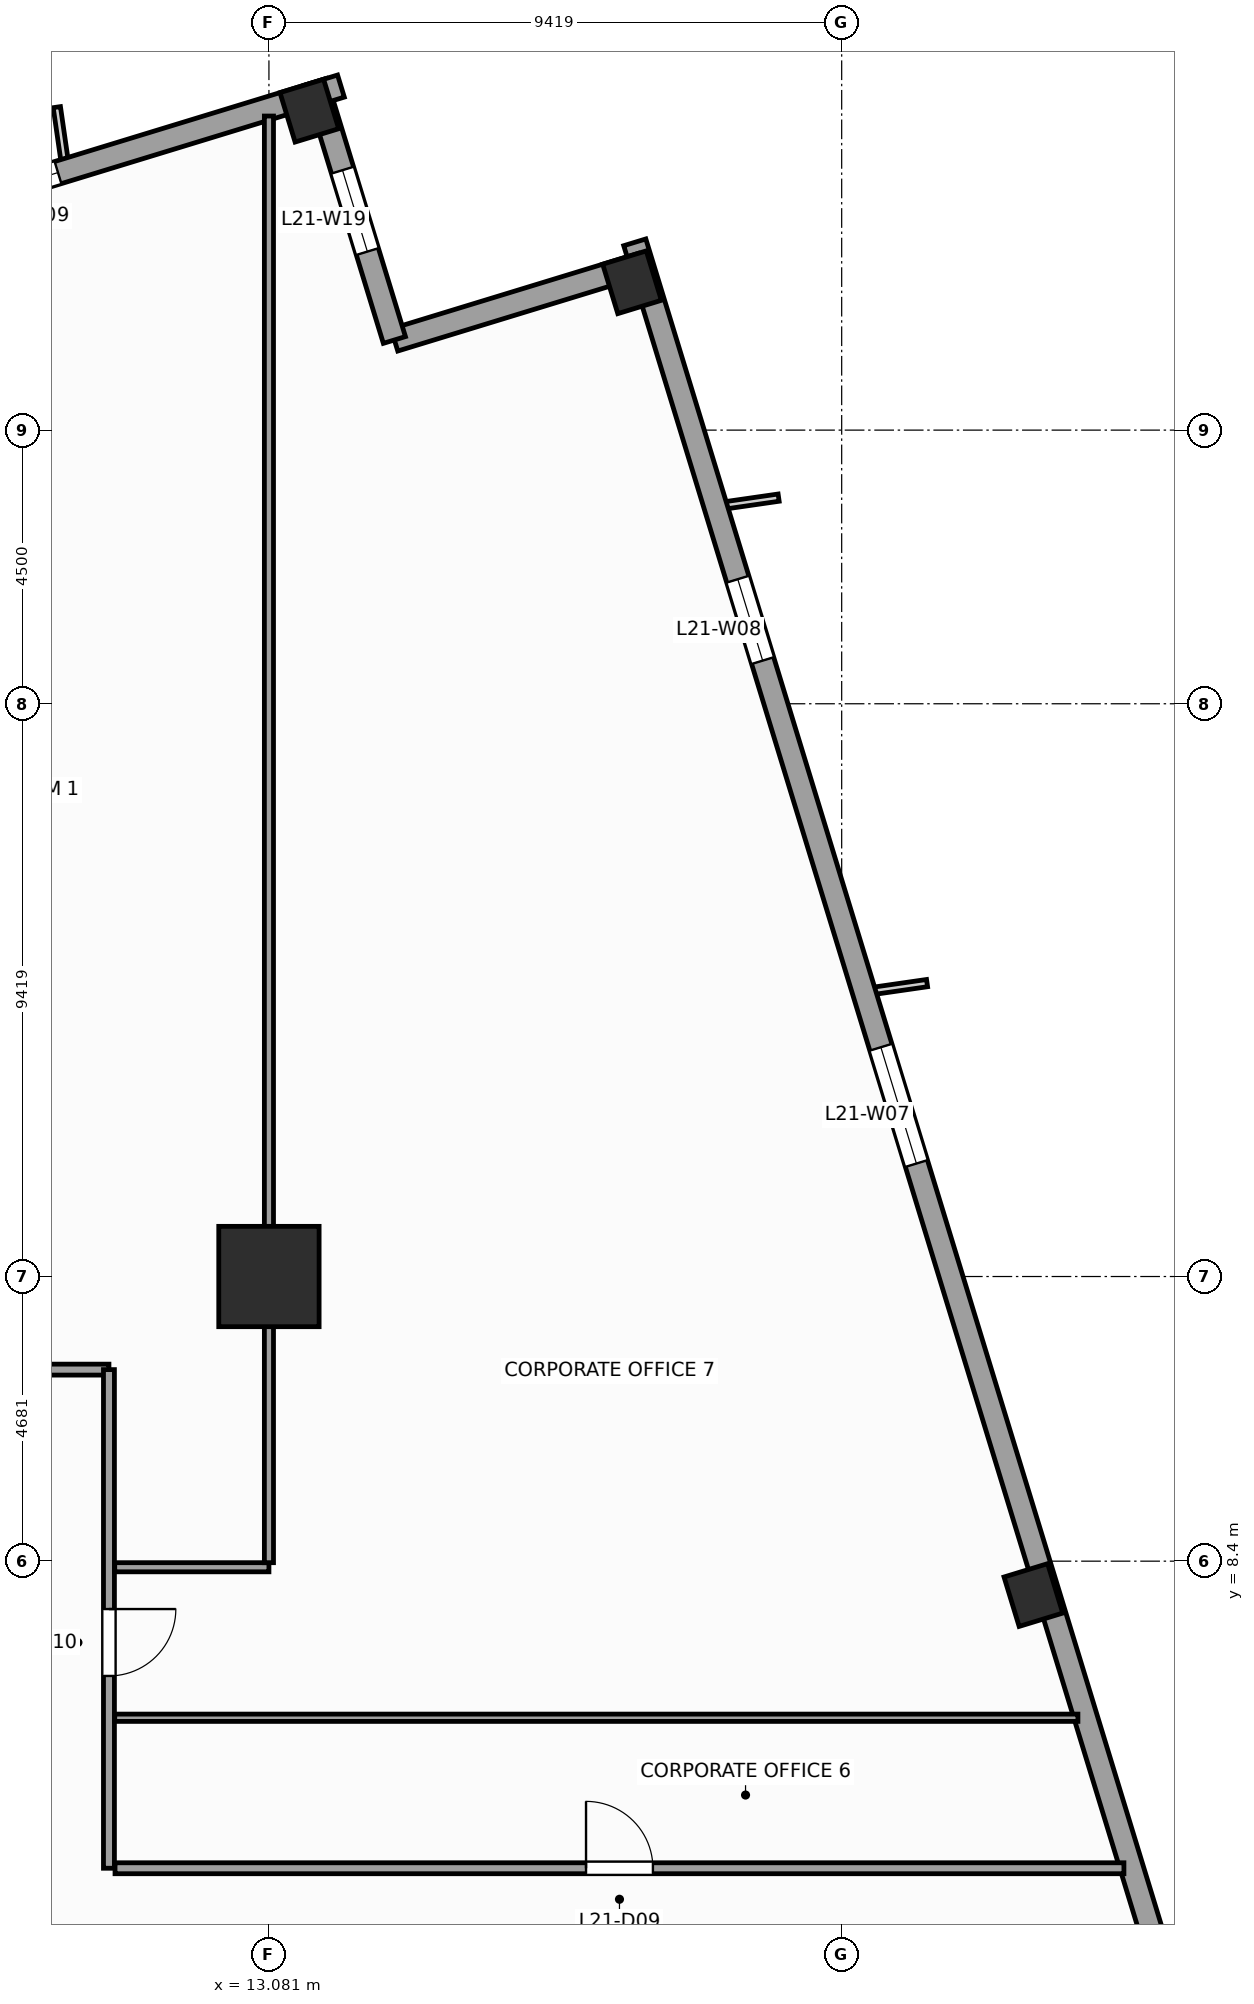
"""IFC4 building model, lengths in metres.
Left out: names, types, materials, properties, quantities, classifications, styles, units other than length and angle.
Written with IfcOpenShell. Run it as: python <this file> out.ifc"""

import sys

from ifc_helpers import new_model, si_unit, direction, frame, frame_2d, origin, origin_2d, place, context, subcontext, project, spatial, rectangle, extrude, source, transform, mapped, element, fill, save


model = new_model("IFC4")
c1 = context("Model", 3, precision=1e-05, world=origin(), true_north=direction((0.0, 1.0)))
c2 = subcontext(c1, "Body", "Model", "MODEL_VIEW")
j1 = project(units=[si_unit("LENGTHUNIT", "METRE"), si_unit("PLANEANGLEUNIT", "RADIAN")], contexts=[c1])
p1 = place(None, origin())
s1 = spatial("IfcSite", under=j1, at=p1, CompositionType="ELEMENT")
p2 = place(p1, origin())
s2 = spatial("IfcBuilding", under=s1, at=p2, CompositionType="ELEMENT")
p3 = place(p2, frame((0.0, 0.0, 91.2)))
s3 = spatial("IfcBuildingStorey", under=s2, at=p3, CompositionType="ELEMENT", Elevation=91.2)
m1 = source(origin(), c2, "Body", "SweptSolid", [
    extrude(rectangle(XDim=1.65, YDim=1.65, at=origin_2d()), origin(), (0.0, 0.0, 1.0), 4.0),
])
p4 = place(p3, frame((13.081, 13.081, 0.0), z_axis=(0.0, 0.0, 1.0), x_axis=(1.0, 0.0, 0.0)))
e1 = element("IfcColumn", 1, at=p4, inside=s3, PredefinedType="COLUMN", context=c2, shape_type="MappedRepresentation", body=[
    mapped(m1, transform((0.0, 0.0, 0.0), scale=1.0)),
])
m2 = source(origin(), c2, "Body", "SweptSolid", [
    extrude(rectangle(XDim=0.75, YDim=0.85, at=origin_2d()), origin(), (0.0, 0.0, 1.0), 4.0),
])
for number, where, z_axis, x_axis in (
    (2, (25.653, 7.843, 0.0), (0.0, 0.0, 1.0), (0.956, 0.292, 0.0)),
    (3, (19.052, 29.431, 0.0), (0.0, 0.0, 1.0), (0.956, 0.292, 0.0)),
    (4, (13.746, 32.253, 0.0), (0.0, 0.0, 1.0), (0.956, 0.292, 0.0)),
):
    element("IfcColumn", number, at=place(p3, frame(where, z_axis=z_axis, x_axis=x_axis)), inside=s3, PredefinedType="COLUMN", context=c2, shape_type="MappedRepresentation", body=[
        mapped(m2, transform((0.0, 0.0, 0.0), scale=1.0)),
    ])
p5 = place(p3, frame((32.658, -14.265, 0.0), z_axis=(0.0, 0.0, 1.0), x_axis=(-0.292373127906, 0.956304320851, 0.0)))
e5 = element("IfcWall", 5, at=p5, inside=s3, PredefinedType="STANDARD", context=c2, shape_type="SweptSolid", body=[
    extrude(rectangle(XDim=46.38, YDim=0.38, at=frame_2d((23.19, 0.0))), origin(), (0.0, 0.0, 1.0), 3.14),
])
p6 = place(p5, frame((4.865, 0.0, 0.51)))
e6 = element("IfcOpeningElement", 6, at=p6, cuts=e5, PredefinedType="OPENING", context=c2, shape_type="SweptSolid", body=[
    extrude(rectangle(XDim=1.4, YDim=2.4, at=frame_2d((0.7, 1.2))), frame((0.0, 0.2, 0.0), z_axis=(0.0, -1.0, 0.0), x_axis=(1.0, 0.0, 0.0)), (0.0, 0.0, 1.0), 0.4),
])
p7 = place(p5, frame((12.45, 0.0, 0.51)))
e7 = element("IfcOpeningElement", 7, at=p7, cuts=e5, PredefinedType="OPENING", context=c2, shape_type="SweptSolid", body=[
    extrude(rectangle(XDim=2.0, YDim=2.4, at=frame_2d((1.0, 1.2))), frame((0.0, 0.2, 0.0), z_axis=(0.0, -1.0, 0.0), x_axis=(1.0, 0.0, 0.0)), (0.0, 0.0, 1.0), 0.4),
])
p8 = place(p5, frame((30.538, 0.0, 0.51)))
e8 = element("IfcOpeningElement", 8, at=p8, cuts=e5, PredefinedType="OPENING", context=c2, shape_type="SweptSolid", body=[
    extrude(rectangle(XDim=2.0, YDim=2.4, at=frame_2d((1.0, 1.2))), frame((0.0, 0.2, 0.0), z_axis=(0.0, -1.0, 0.0), x_axis=(1.0, 0.0, 0.0)), (0.0, 0.0, 1.0), 0.4),
])
p9 = place(p5, frame((39.187, 0.0, 0.51)))
e9 = element("IfcOpeningElement", 9, at=p9, cuts=e5, PredefinedType="OPENING", context=c2, shape_type="SweptSolid", body=[
    extrude(rectangle(XDim=1.4, YDim=2.4, at=frame_2d((0.7, 1.2))), frame((0.0, 0.2, 0.0), z_axis=(0.0, -1.0, 0.0), x_axis=(1.0, 0.0, 0.0)), (0.0, 0.0, 1.0), 0.4),
])
p10 = place(p3, frame((19.208, 29.725, 0.0), z_axis=(0.0, 0.0, 1.0), x_axis=(-0.956312764915, -0.292345507338, 0.0)))
e10 = element("IfcWall", 10, at=p10, inside=s3, PredefinedType="STANDARD", context=c2, shape_type="SweptSolid", body=[
    extrude(rectangle(XDim=4.25, YDim=0.38, at=frame_2d((2.125, 0.0))), origin(), (0.0, 0.0, 1.0), 3.74),
])
p11 = place(p3, frame((15.144, 28.482, 0.0), z_axis=(0.0, 0.0, 1.0), x_axis=(-0.292373601522, 0.956304176051, 0.0)))
e11 = element("IfcWall", 11, at=p11, inside=s3, PredefinedType="STANDARD", context=c2, shape_type="SweptSolid", body=[
    extrude(rectangle(XDim=4.44, YDim=0.38, at=frame_2d((2.22, 0.0))), origin(), (0.0, 0.0, 1.0), 3.04),
])
p12 = place(p11, frame((1.52, 0.0, 0.51)))
e12 = element("IfcOpeningElement", 12, at=p12, cuts=e11, PredefinedType="OPENING", context=c2, shape_type="SweptSolid", body=[
    extrude(rectangle(XDim=1.4, YDim=2.4, at=frame_2d((0.7, 1.2))), frame((0.0, 0.2, 0.0), z_axis=(0.0, -1.0, 0.0), x_axis=(1.0, 0.0, 0.0)), (0.0, 0.0, 1.0), 0.4),
])
p13 = place(p3, frame((14.265, 32.658, 0.0), z_axis=(0.0, 0.0, 1.0), x_axis=(-0.956304320851, -0.292373127906, 0.0)))
e13 = element("IfcWall", 13, at=p13, inside=s3, PredefinedType="STANDARD", context=c2, shape_type="SweptSolid", body=[
    extrude(rectangle(XDim=46.38, YDim=0.38, at=frame_2d((23.19, 0.0))), origin(), (0.0, 0.0, 1.0), 3.14),
])
p14 = place(p13, frame((17.065, 0.0, 0.0)))
e14 = element("IfcOpeningElement", 14, at=p14, cuts=e13, PredefinedType="OPENING", context=c2, shape_type="SweptSolid", body=[
    extrude(rectangle(XDim=1.05, YDim=2.25, at=frame_2d((0.525, 1.125))), frame((0.0, 0.2, 0.0), z_axis=(0.0, -1.0, 0.0), x_axis=(1.0, 0.0, 0.0)), (0.0, 0.0, 1.0), 0.4),
])
p15 = place(p13, frame((4.865, 0.0, 0.51)))
e15 = element("IfcOpeningElement", 15, at=p15, cuts=e13, PredefinedType="OPENING", context=c2, shape_type="SweptSolid", body=[
    extrude(rectangle(XDim=1.4, YDim=2.4, at=frame_2d((0.7, 1.2))), frame((0.0, 0.2, 0.0), z_axis=(0.0, -1.0, 0.0), x_axis=(1.0, 0.0, 0.0)), (0.0, 0.0, 1.0), 0.4),
])
p16 = place(p13, frame((12.45, 0.0, 0.51)))
e16 = element("IfcOpeningElement", 16, at=p16, cuts=e13, PredefinedType="OPENING", context=c2, shape_type="SweptSolid", body=[
    extrude(rectangle(XDim=2.0, YDim=2.4, at=frame_2d((1.0, 1.2))), frame((0.0, 0.2, 0.0), z_axis=(0.0, -1.0, 0.0), x_axis=(1.0, 0.0, 0.0)), (0.0, 0.0, 1.0), 0.4),
])
p17 = place(p13, frame((30.538, 0.0, 0.51)))
e17 = element("IfcOpeningElement", 17, at=p17, cuts=e13, PredefinedType="OPENING", context=c2, shape_type="SweptSolid", body=[
    extrude(rectangle(XDim=2.0, YDim=2.4, at=frame_2d((1.0, 1.2))), frame((0.0, 0.2, 0.0), z_axis=(0.0, -1.0, 0.0), x_axis=(1.0, 0.0, 0.0)), (0.0, 0.0, 1.0), 0.4),
])
p18 = place(p13, frame((39.187, 0.0, 0.51)))
e18 = element("IfcOpeningElement", 18, at=p18, cuts=e13, PredefinedType="OPENING", context=c2, shape_type="SweptSolid", body=[
    extrude(rectangle(XDim=1.4, YDim=2.4, at=frame_2d((0.7, 1.2))), frame((0.0, 0.2, 0.0), z_axis=(0.0, -1.0, 0.0), x_axis=(1.0, 0.0, 0.0)), (0.0, 0.0, 1.0), 0.4),
])
p19 = place(p3, frame((-12.6, 11.55, 0.0), z_axis=(0.0, 0.0, 1.0), x_axis=(1.0, 0.0, 0.0)))
e19 = element("IfcWall", 19, at=p19, inside=s3, PredefinedType="PARTITIONING", context=c2, shape_type="SweptSolid", body=[
    extrude(rectangle(XDim=23.05, YDim=0.18, at=frame_2d((11.525, 0.0))), origin(), (0.0, 0.0, 1.0), 3.74),
])
p20 = place(p19, frame((2.514, 0.0, 0.0)))
e20 = element("IfcOpeningElement", 20, at=p20, cuts=e19, PredefinedType="OPENING", context=c2, shape_type="SweptSolid", body=[
    extrude(rectangle(XDim=1.1, YDim=2.2, at=frame_2d((0.55, 1.1))), frame((0.0, 0.1, 0.0), z_axis=(0.0, -1.0, 0.0), x_axis=(1.0, 0.0, 0.0)), (0.0, 0.0, 1.0), 0.2),
])
p21 = place(p19, frame((8.05, 0.0, 0.0)))
e21 = element("IfcOpeningElement", 21, at=p21, cuts=e19, PredefinedType="OPENING", context=c2, shape_type="SweptSolid", body=[
    extrude(rectangle(XDim=1.1, YDim=2.2, at=frame_2d((0.55, 1.1))), frame((0.0, 0.1, 0.0), z_axis=(0.0, -1.0, 0.0), x_axis=(1.0, 0.0, 0.0)), (0.0, 0.0, 1.0), 0.2),
])
p22 = place(p19, frame((13.65, 0.0, 0.0)))
e22 = element("IfcOpeningElement", 22, at=p22, cuts=e19, PredefinedType="OPENING", context=c2, shape_type="SweptSolid", body=[
    extrude(rectangle(XDim=1.1, YDim=2.2, at=frame_2d((0.55, 1.1))), frame((0.0, 0.1, 0.0), z_axis=(0.0, -1.0, 0.0), x_axis=(1.0, 0.0, 0.0)), (0.0, 0.0, 1.0), 0.2),
])
p23 = place(p19, frame((19.311, 0.0, 0.0)))
e23 = element("IfcOpeningElement", 23, at=p23, cuts=e19, PredefinedType="OPENING", context=c2, shape_type="SweptSolid", body=[
    extrude(rectangle(XDim=1.1, YDim=2.2, at=frame_2d((0.55, 1.1))), frame((0.0, 0.1, 0.0), z_axis=(0.0, -1.0, 0.0), x_axis=(1.0, 0.0, 0.0)), (0.0, 0.0, 1.0), 0.2),
])
p24 = place(p3, frame((10.45, 3.35, 0.0), z_axis=(0.0, 0.0, 1.0), x_axis=(0.0, 1.0, 0.0)))
e24 = element("IfcWall", 24, at=p24, inside=s3, PredefinedType="PARTITIONING", context=c2, shape_type="SweptSolid", body=[
    extrude(rectangle(XDim=8.2, YDim=0.18, at=frame_2d((4.1, 0.0))), origin(), (0.0, 0.0, 1.0), 3.74),
])
p25 = place(p24, frame((3.163, 0.0, 0.0)))
e25 = element("IfcOpeningElement", 25, at=p25, cuts=e24, PredefinedType="OPENING", context=c2, shape_type="SweptSolid", body=[
    extrude(rectangle(XDim=1.1, YDim=2.2, at=frame_2d((0.55, 1.1))), frame((0.0, 0.1, 0.0), z_axis=(0.0, -1.0, 0.0), x_axis=(1.0, 0.0, 0.0)), (0.0, 0.0, 1.0), 0.2),
])
p26 = place(p3, frame((10.55, 3.35, 0.0), z_axis=(0.0, 0.0, 1.0), x_axis=(1.0, 0.0, 0.0)))
e26 = element("IfcWall", 26, at=p26, inside=s3, PredefinedType="PARTITIONING", context=c2, shape_type="SweptSolid", body=[
    extrude(rectangle(XDim=16.592, YDim=0.18, at=frame_2d((8.296, 0.0))), origin(), (0.0, 0.0, 1.0), 3.74),
])
p27 = place(p26, frame((7.746, 0.0, 0.0)))
e27 = element("IfcOpeningElement", 27, at=p27, cuts=e26, PredefinedType="OPENING", context=c2, shape_type="SweptSolid", body=[
    extrude(rectangle(XDim=1.1, YDim=2.2, at=frame_2d((0.55, 1.1))), frame((0.0, 0.1, 0.0), z_axis=(0.0, -1.0, 0.0), x_axis=(1.0, 0.0, 0.0)), (0.0, 0.0, 1.0), 0.2),
])
p28 = place(p3, frame((10.545, 8.3, 0.0), z_axis=(0.0, 0.0, 1.0), x_axis=(1.0, 0.0, 0.0)))
e28 = element("IfcWall", 28, at=p28, inside=s3, PredefinedType="PARTITIONING", context=c2, shape_type="SweptSolid", body=[
    extrude(rectangle(XDim=2.536, YDim=0.15, at=frame_2d((1.268, 0.0))), origin(), (0.0, 0.0, 1.0), 3.74),
])
p29 = place(p3, frame((13.081, 8.375, 0.0), z_axis=(0.0, 0.0, 1.0), x_axis=(0.0, 1.0, 0.0)))
e29 = element("IfcWall", 29, at=p29, inside=s3, PredefinedType="PARTITIONING", context=c2, shape_type="SweptSolid", body=[
    extrude(rectangle(XDim=23.79, YDim=0.15, at=frame_2d((11.895, 0.0))), origin(), (0.0, 0.0, 1.0), 2.732),
])
p30 = place(p3, frame((10.545, 5.825, 0.0), z_axis=(0.0, 0.0, 1.0), x_axis=(1.0, 0.0, 0.0)))
e30 = element("IfcWall", 30, at=p30, inside=s3, PredefinedType="PARTITIONING", context=c2, shape_type="SweptSolid", body=[
    extrude(rectangle(XDim=15.84, YDim=0.12, at=frame_2d((7.92, 0.0))), origin(), (0.0, 0.0, 1.0), 3.74),
])
m3 = source(origin(), c2, "Body", "SweptSolid", [
    extrude(rectangle(XDim=2.0, YDim=2.4, at=frame_2d((1.0, 1.2))), frame((0.0, 0.03, 0.0), z_axis=(0.0, -1.0, 0.0), x_axis=(1.0, 0.0, 0.0)), (0.0, 0.0, 1.0), 0.06),
])
p31 = place(p8, origin())
e31 = element("IfcWindow", 31, at=p31, inside=s3, PartitioningType="SINGLE_PANEL", PredefinedType="WINDOW", context=c2, shape_type="MappedRepresentation", body=[
    mapped(m3, transform((0.0, 0.0, 0.0), scale=1.0)),
])
fill(e8, e31)
m4 = source(origin(), c2, "Body", "SweptSolid", [
    extrude(rectangle(XDim=1.4, YDim=2.4, at=frame_2d((0.7, 1.2))), frame((0.0, 0.03, 0.0), z_axis=(0.0, -1.0, 0.0), x_axis=(1.0, 0.0, 0.0)), (0.0, 0.0, 1.0), 0.06),
])
p32 = place(p9, origin())
e32 = element("IfcWindow", 32, at=p32, inside=s3, PartitioningType="SINGLE_PANEL", PredefinedType="WINDOW", context=c2, shape_type="MappedRepresentation", body=[
    mapped(m4, transform((0.0, 0.0, 0.0), scale=1.0)),
])
fill(e9, e32)
p33 = place(p15, origin())
e33 = element("IfcWindow", 33, at=p33, inside=s3, PartitioningType="SINGLE_PANEL", PredefinedType="WINDOW", context=c2, shape_type="MappedRepresentation", body=[
    mapped(m4, transform((0.0, 0.0, 0.0), scale=1.0)),
])
fill(e15, e33)
p34 = place(p12, origin())
e34 = element("IfcWindow", 34, at=p34, inside=s3, PartitioningType="SINGLE_PANEL", PredefinedType="WINDOW", context=c2, shape_type="MappedRepresentation", body=[
    mapped(m4, transform((0.0, 0.0, 0.0), scale=1.0)),
])
fill(e12, e34)
m5 = source(origin(), c2, "Body", "SweptSolid", [
    extrude(rectangle(XDim=1.1, YDim=2.2, at=frame_2d((0.55, 1.1))), frame((0.0, 0.025, 0.0), z_axis=(0.0, -1.0, 0.0), x_axis=(1.0, 0.0, 0.0)), (0.0, 0.0, 1.0), 0.05),
])
p35 = place(p27, origin())
e35 = element("IfcDoor", 35, at=p35, inside=s3, OperationType="SINGLE_SWING_LEFT", PredefinedType="DOOR", context=c2, shape_type="MappedRepresentation", body=[
    mapped(m5, transform((0.0, 0.0, 0.0), scale=1.0)),
])
fill(e27, e35)
p36 = place(p25, frame((1.1, 0.0, 0.0), z_axis=(0.0, 0.0, 1.0), x_axis=(-1.0, 0.0, 0.0)))
e36 = element("IfcDoor", 36, at=p36, inside=s3, OperationType="SINGLE_SWING_RIGHT", PredefinedType="DOOR", context=c2, shape_type="MappedRepresentation", body=[
    mapped(m5, transform((0.0, 0.0, 0.0), scale=1.0)),
])
fill(e25, e36)
save(model, sys.argv[1])
